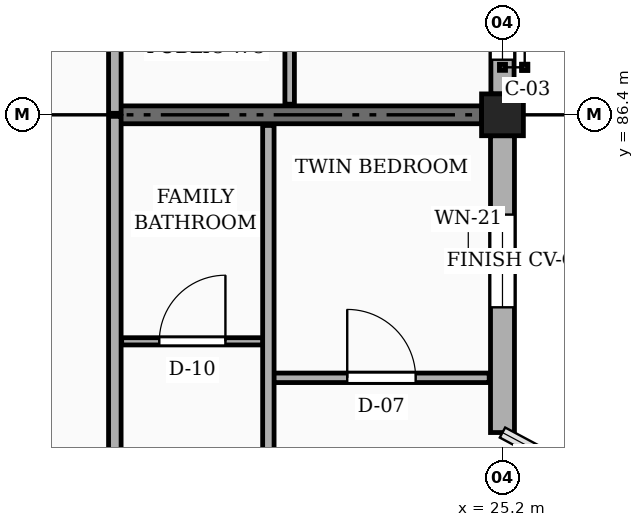
"""IFC4 building model, lengths in metres.
Left out: names, types, materials, properties, quantities, classifications, styles, units other than length and angle.
Written with IfcOpenShell. Run it as: python <this file> out.ifc"""

import sys

from ifc_helpers import new_model, si_unit, direction, frame, frame_2d, origin, origin_2d, place, context, subcontext, project, spatial, rectangle, extrude, element, fill, save


model = new_model("IFC4")
c1 = context("Model", 3, precision=1e-05, world=origin(), true_north=direction((0.0, 1.0)))
c2 = subcontext(c1, "Body", "Model", "MODEL_VIEW")
j1 = project(units=[si_unit("LENGTHUNIT", "METRE"), si_unit("PLANEANGLEUNIT", "RADIAN")], contexts=[c1])
p1 = place(None, origin())
s1 = spatial("IfcSite", under=j1, at=p1, CompositionType="ELEMENT")
p2 = place(p1, origin())
s2 = spatial("IfcBuilding", under=s1, at=p2, CompositionType="ELEMENT")
p3 = place(p2, frame((0.0, 0.0, 20.25)))
s3 = spatial("IfcBuildingStorey", under=s2, at=p3, CompositionType="ELEMENT", Elevation=20.25)
p4 = place(p3, frame((25.2, 86.4, 0.0), z_axis=(0.0, 0.0, 1.0), x_axis=(1.0, 0.0, 0.0)))
e1 = element("IfcColumn", 1, at=p4, inside=s3, PredefinedType="COLUMN", context=c2, shape_type="SweptSolid", body=[
    extrude(rectangle(XDim=0.55, YDim=0.55, at=origin_2d()), origin(), (0.0, 0.0, 1.0), 3.15),
])
p5 = place(p3, frame((20.1, 86.4, 0.0), z_axis=(0.0, 0.0, 1.0), x_axis=(1.0, 0.0, 0.0)))
e2 = element("IfcWall", 2, at=p5, inside=s3, PredefinedType="SOLIDWALL", context=c2, shape_type="SweptSolid", body=[
    extrude(rectangle(XDim=4.825, YDim=0.235, at=frame_2d((2.413, 0.0))), origin(), (0.0, 0.0, 1.0), 2.21),
])
p6 = place(p3, frame((25.2, 82.22, 0.0), z_axis=(0.0, 0.0, 1.0), x_axis=(0.0, 1.0, 0.0)))
e3 = element("IfcWall", 3, at=p6, inside=s3, PredefinedType="SOLIDWALL", context=c2, shape_type="SweptSolid", body=[
    extrude(rectangle(XDim=3.905, YDim=0.315, at=frame_2d((1.953, 0.0))), origin(), (0.0, 0.0, 1.0), 2.48),
])
p7 = place(p6, frame((1.647, 0.0, 0.78)))
e4 = element("IfcOpeningElement", 4, at=p7, cuts=e3, PredefinedType="OPENING", context=c2, shape_type="SweptSolid", body=[
    extrude(rectangle(XDim=1.22, YDim=1.36, at=frame_2d((0.61, 0.68))), frame((0.0, 0.167, 0.0), z_axis=(0.0, -1.0, 0.0), x_axis=(1.0, 0.0, 0.0)), (0.0, 0.0, 1.0), 0.335),
])
p8 = place(p3, frame((25.2, 86.675, 0.0), z_axis=(0.0, 0.0, 1.0), x_axis=(0.0, 1.0, 0.0)))
e5 = element("IfcWall", 5, at=p8, inside=s3, PredefinedType="SOLIDWALL", context=c2, shape_type="SweptSolid", body=[
    extrude(rectangle(XDim=6.65, YDim=0.305, at=frame_2d((3.325, 0.0))), origin(), (0.0, 0.0, 1.0), 2.48),
])
p9 = place(p8, frame((0.45, 0.0, 0.78)))
e6 = element("IfcOpeningElement", 6, at=p9, cuts=e5, PredefinedType="OPENING", context=c2, shape_type="SweptSolid", body=[
    extrude(rectangle(XDim=1.3, YDim=1.36, at=frame_2d((0.65, 0.68))), frame((0.0, 0.163, 0.0), z_axis=(0.0, -1.0, 0.0), x_axis=(1.0, 0.0, 0.0)), (0.0, 0.0, 1.0), 0.325),
])
p10 = place(p8, frame((4.65, 0.0, 0.78)))
e7 = element("IfcOpeningElement", 7, at=p10, cuts=e5, PredefinedType="OPENING", context=c2, shape_type="SweptSolid", body=[
    extrude(rectangle(XDim=1.46, YDim=1.36, at=frame_2d((0.73, 0.68))), frame((0.0, 0.163, 0.0), z_axis=(0.0, -1.0, 0.0), x_axis=(1.0, 0.0, 0.0)), (0.0, 0.0, 1.0), 0.325),
])
p11 = place(p3, frame((20.1, 79.22, 0.0), z_axis=(0.0, 0.0, 1.0), x_axis=(0.0, 1.0, 0.0)))
e8 = element("IfcWall", 8, at=p11, inside=s3, PredefinedType="PARTITIONING", context=c2, shape_type="SweptSolid", body=[
    extrude(rectangle(XDim=7.16, YDim=0.165, at=frame_2d((3.58, 0.0))), origin(), (0.0, 0.0, 1.0), 2.345),
])
p12 = place(p11, frame((1.33, 0.0, 0.0)))
e9 = element("IfcOpeningElement", 9, at=p12, cuts=e8, PredefinedType="OPENING", context=c2, shape_type="SweptSolid", body=[
    extrude(rectangle(XDim=1.14, YDim=2.18, at=frame_2d((0.57, 1.09))), frame((0.0, 0.093, 0.0), z_axis=(0.0, -1.0, 0.0), x_axis=(1.0, 0.0, 0.0)), (0.0, 0.0, 1.0), 0.185),
])
p13 = place(p3, frame((20.1, 86.42, 0.0), z_axis=(0.0, 0.0, 1.0), x_axis=(0.0, 1.0, 0.0)))
e10 = element("IfcWall", 10, at=p13, inside=s3, PredefinedType="PARTITIONING", context=c2, shape_type="SweptSolid", body=[
    extrude(rectangle(XDim=7.005, YDim=0.165, at=frame_2d((3.502, 0.0))), origin(), (0.0, 0.0, 1.0), 2.345),
])
p14 = place(p13, frame((4.33, 0.0, 0.0)))
e11 = element("IfcOpeningElement", 11, at=p14, cuts=e10, PredefinedType="OPENING", context=c2, shape_type="SweptSolid", body=[
    extrude(rectangle(XDim=1.1, YDim=2.15, at=frame_2d((0.55, 1.075))), frame((0.0, 0.093, 0.0), z_axis=(0.0, -1.0, 0.0), x_axis=(1.0, 0.0, 0.0)), (0.0, 0.0, 1.0), 0.185),
])
p15 = place(p3, frame((22.19, 82.94, 0.0), z_axis=(0.0, 0.0, 1.0), x_axis=(1.0, 0.0, 0.0)))
e12 = element("IfcWall", 12, at=p15, inside=s3, PredefinedType="PARTITIONING", context=c2, shape_type="SweptSolid", body=[
    extrude(rectangle(XDim=2.835, YDim=0.125, at=frame_2d((1.417, 0.0))), origin(), (0.0, 0.0, 1.0), 2.345),
])
p16 = place(p15, frame((0.968, 0.0, 0.0)))
e13 = element("IfcOpeningElement", 13, at=p16, cuts=e12, PredefinedType="OPENING", context=c2, shape_type="SweptSolid", body=[
    extrude(rectangle(XDim=0.9, YDim=2.1, at=frame_2d((0.45, 1.05))), frame((0.0, 0.073, 0.0), z_axis=(0.0, -1.0, 0.0), x_axis=(1.0, 0.0, 0.0)), (0.0, 0.0, 1.0), 0.145),
])
p17 = place(p3, frame((20.19, 83.42, 0.0), z_axis=(0.0, 0.0, 1.0), x_axis=(1.0, 0.0, 0.0)))
e14 = element("IfcWall", 14, at=p17, inside=s3, PredefinedType="PARTITIONING", context=c2, shape_type="SweptSolid", body=[
    extrude(rectangle(XDim=1.86, YDim=0.095, at=frame_2d((0.93, 0.0))), origin(), (0.0, 0.0, 1.0), 2.345),
])
p18 = place(p17, frame((0.495, 0.0, 0.0)))
e15 = element("IfcOpeningElement", 15, at=p18, cuts=e14, PredefinedType="OPENING", context=c2, shape_type="SweptSolid", body=[
    extrude(rectangle(XDim=0.87, YDim=2.05, at=frame_2d((0.435, 1.025))), frame((0.0, 0.058, 0.0), z_axis=(0.0, -1.0, 0.0), x_axis=(1.0, 0.0, 0.0)), (0.0, 0.0, 1.0), 0.115),
])
p19 = place(p3, frame((22.12, 79.34, 0.0), z_axis=(0.0, 0.0, 1.0), x_axis=(0.0, 1.0, 0.0)))
e16 = element("IfcWall", 16, at=p19, inside=s3, PredefinedType="PARTITIONING", context=c2, shape_type="SweptSolid", body=[
    extrude(rectangle(XDim=6.92, YDim=0.15, at=frame_2d((3.46, 0.0))), origin(), (0.0, 0.0, 1.0), 2.345),
])
p20 = place(p19, frame((1.31, 0.0, 0.0)))
e17 = element("IfcOpeningElement", 17, at=p20, cuts=e16, PredefinedType="OPENING", context=c2, shape_type="SweptSolid", body=[
    extrude(rectangle(XDim=0.95, YDim=2.1, at=frame_2d((0.475, 1.05))), frame((0.0, 0.085, 0.0), z_axis=(0.0, -1.0, 0.0), x_axis=(1.0, 0.0, 0.0)), (0.0, 0.0, 1.0), 0.17),
])
p21 = place(p3, frame((22.4, 86.54, 0.0), z_axis=(0.0, 0.0, 1.0), x_axis=(0.0, 1.0, 0.0)))
e18 = element("IfcWall", 18, at=p21, inside=s3, PredefinedType="PARTITIONING", context=c2, shape_type="SweptSolid", body=[
    extrude(rectangle(XDim=2.41, YDim=0.125, at=frame_2d((1.205, 0.0))), origin(), (0.0, 0.0, 1.0), 2.345),
])
p22 = place(p7, origin())
e19 = element("IfcWindow", 19, at=p22, inside=s3, PartitioningType="SINGLE_PANEL", PredefinedType="WINDOW", context=c2, shape_type="SweptSolid", body=[
    extrude(rectangle(XDim=1.22, YDim=1.36, at=frame_2d((0.61, 0.68))), frame((0.0, 0.03, 0.0), z_axis=(0.0, -1.0, 0.0), x_axis=(1.0, 0.0, 0.0)), (0.0, 0.0, 1.0), 0.06),
])
fill(e4, e19)
p23 = place(p9, origin())
e20 = element("IfcWindow", 20, at=p23, inside=s3, PartitioningType="SINGLE_PANEL", PredefinedType="WINDOW", context=c2, shape_type="SweptSolid", body=[
    extrude(rectangle(XDim=1.3, YDim=1.36, at=frame_2d((0.65, 0.68))), frame((0.0, 0.03, 0.0), z_axis=(0.0, -1.0, 0.0), x_axis=(1.0, 0.0, 0.0)), (0.0, 0.0, 1.0), 0.06),
])
fill(e6, e20)
p24 = place(p16, origin())
e21 = element("IfcDoor", 21, at=p24, inside=s3, OperationType="SINGLE_SWING_LEFT", PredefinedType="DOOR", context=c2, shape_type="SweptSolid", body=[
    extrude(rectangle(XDim=0.9, YDim=2.1, at=frame_2d((0.45, 1.05))), frame((0.0, 0.025, 0.0), z_axis=(0.0, -1.0, 0.0), x_axis=(1.0, 0.0, 0.0)), (0.0, 0.0, 1.0), 0.05),
])
fill(e13, e21)
p25 = place(p18, origin())
e22 = element("IfcDoor", 22, at=p25, inside=s3, OperationType="SINGLE_SWING_RIGHT", PredefinedType="DOOR", context=c2, shape_type="SweptSolid", body=[
    extrude(rectangle(XDim=0.87, YDim=2.05, at=frame_2d((0.435, 1.025))), frame((0.0, 0.025, 0.0), z_axis=(0.0, -1.0, 0.0), x_axis=(1.0, 0.0, 0.0)), (0.0, 0.0, 1.0), 0.05),
])
fill(e15, e22)
save(model, sys.argv[1])
